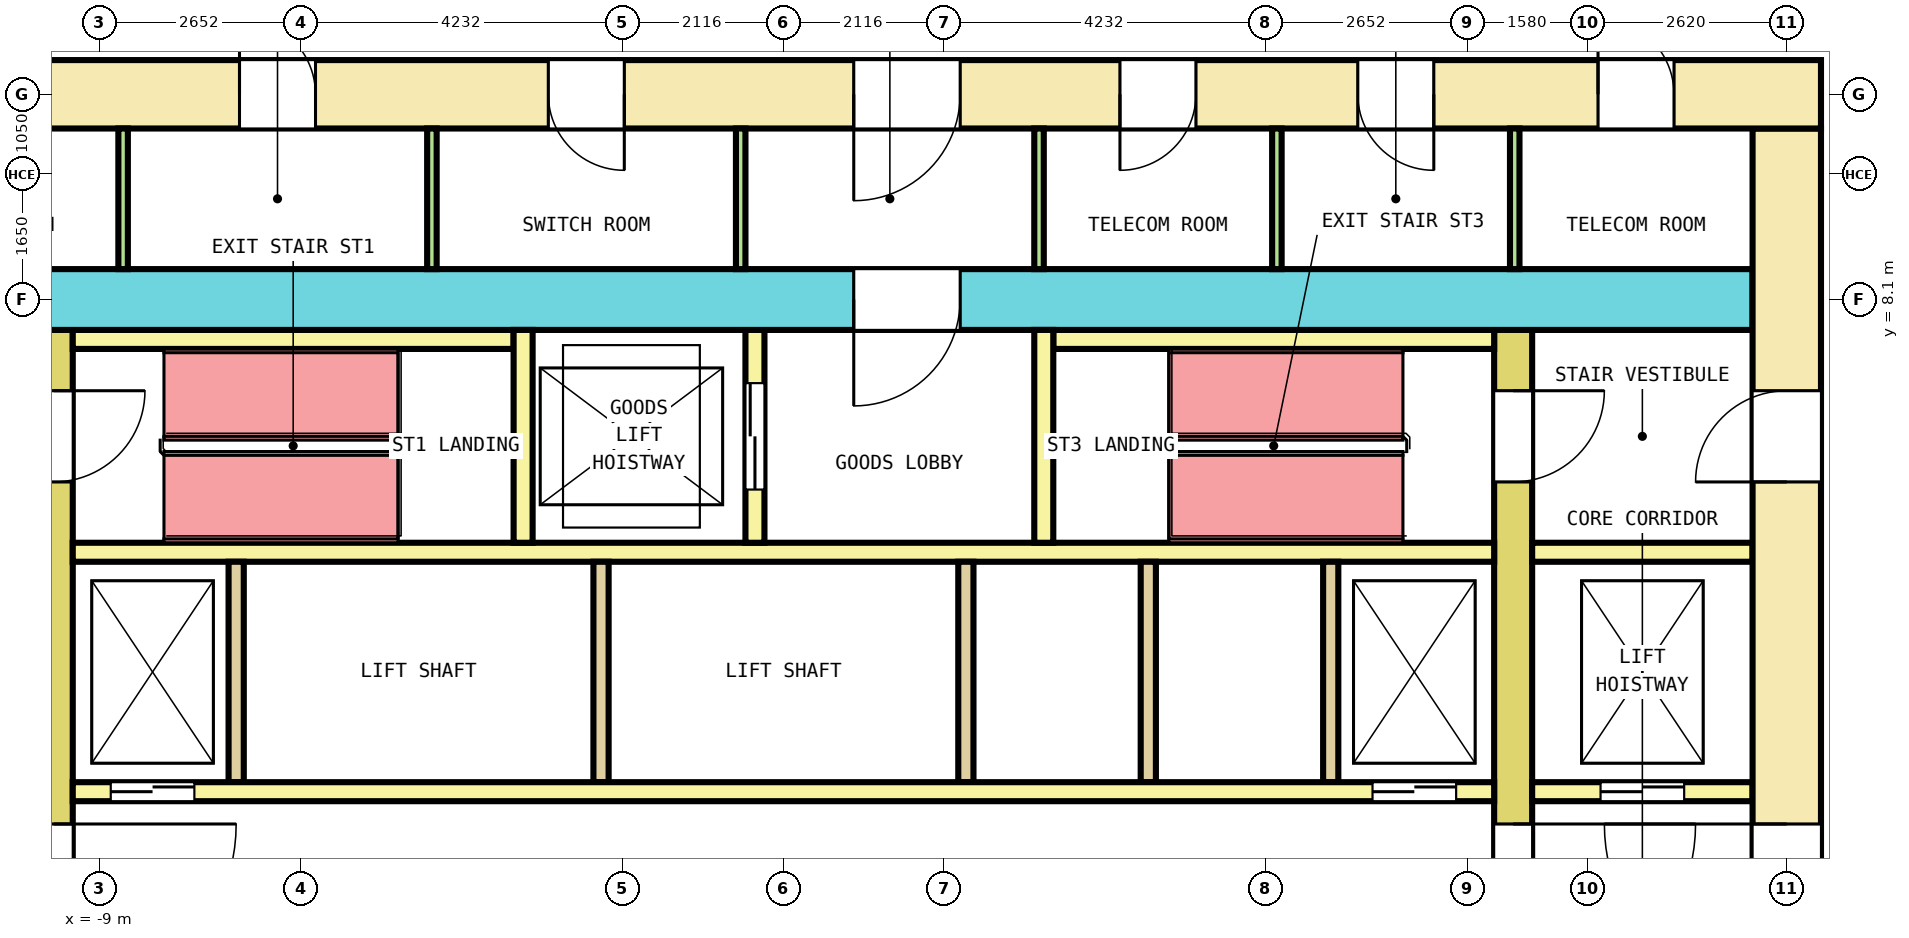
"""IFC4 building model, lengths in metres.
Left out: names, types, materials, properties, quantities, classifications, styles, units other than length and angle.
Written with IfcOpenShell. Run it as: python <this file> out.ifc"""

import sys

from ifc_helpers import new_model, si_unit, direction, frame, frame_2d, origin, place, context, subcontext, project, spatial, rectangle, extrude, element, fill, save


model = new_model("IFC4")
c1 = context("Model", 3, precision=1e-05, world=origin(), true_north=direction((0.0, 1.0)))
c2 = subcontext(c1, "Body", "Model", "MODEL_VIEW")
j1 = project(units=[si_unit("LENGTHUNIT", "METRE"), si_unit("PLANEANGLEUNIT", "RADIAN")], contexts=[c1])
p1 = place(None, origin())
s1 = spatial("IfcSite", under=j1, at=p1, CompositionType="ELEMENT")
p2 = place(p1, origin())
s2 = spatial("IfcBuilding", under=s1, at=p2, CompositionType="ELEMENT")
p3 = place(p2, frame((0.0, 0.0, 45.4)))
s3 = spatial("IfcBuildingStorey", under=s2, at=p3, CompositionType="ELEMENT", Elevation=45.4)
p4 = place(p3, frame((-13.65, 10.8, 0.0), z_axis=(0.0, 0.0, 1.0), x_axis=(1.0, 0.0, 0.0)))
e1 = element("IfcWall", 1, at=p4, inside=s3, PredefinedType="SHEAR", context=c2, shape_type="SweptSolid", body=[
    extrude(rectangle(XDim=27.3, YDim=0.9, at=frame_2d((13.65, 0.0))), origin(), (0.0, 0.0, 1.0), 4.1),
])
p5 = place(p4, frame((2.4, 0.0, 0.0)))
e2 = element("IfcOpeningElement", 2, at=p5, cuts=e1, PredefinedType="OPENING", context=c2, shape_type="SweptSolid", body=[
    extrude(rectangle(XDim=1.0, YDim=2.1, at=frame_2d((0.5, 1.05))), frame((0.0, 0.46, 0.0), z_axis=(0.0, -1.0, 0.0), x_axis=(1.0, 0.0, 0.0)), (0.0, 0.0, 1.0), 0.92),
])
p6 = place(p4, frame((6.494, 0.0, 0.0)))
e3 = element("IfcOpeningElement", 3, at=p6, cuts=e1, PredefinedType="OPENING", context=c2, shape_type="SweptSolid", body=[
    extrude(rectangle(XDim=1.0, YDim=2.1, at=frame_2d((0.5, 1.05))), frame((0.0, 0.46, 0.0), z_axis=(0.0, -1.0, 0.0), x_axis=(1.0, 0.0, 0.0)), (0.0, 0.0, 1.0), 0.92),
])
p7 = place(p4, frame((10.556, 0.0, 0.0)))
e4 = element("IfcOpeningElement", 4, at=p7, cuts=e1, PredefinedType="OPENING", context=c2, shape_type="SweptSolid", body=[
    extrude(rectangle(XDim=1.0, YDim=2.1, at=frame_2d((0.5, 1.05))), frame((0.0, 0.46, 0.0), z_axis=(0.0, -1.0, 0.0), x_axis=(1.0, 0.0, 0.0)), (0.0, 0.0, 1.0), 0.92),
])
p8 = place(p4, frame((18.077, 0.0, 0.0)))
e5 = element("IfcOpeningElement", 5, at=p8, cuts=e1, PredefinedType="OPENING", context=c2, shape_type="SweptSolid", body=[
    extrude(rectangle(XDim=1.0, YDim=2.1, at=frame_2d((0.5, 1.05))), frame((0.0, 0.46, 0.0), z_axis=(0.0, -1.0, 0.0), x_axis=(1.0, 0.0, 0.0)), (0.0, 0.0, 1.0), 0.92),
])
p9 = place(p4, frame((21.206, 0.0, 0.0)))
e6 = element("IfcOpeningElement", 6, at=p9, cuts=e1, PredefinedType="OPENING", context=c2, shape_type="SweptSolid", body=[
    extrude(rectangle(XDim=1.0, YDim=2.1, at=frame_2d((0.5, 1.05))), frame((0.0, 0.46, 0.0), z_axis=(0.0, -1.0, 0.0), x_axis=(1.0, 0.0, 0.0)), (0.0, 0.0, 1.0), 0.92),
])
p10 = place(p4, frame((24.367, 0.0, 0.0)))
e7 = element("IfcOpeningElement", 7, at=p10, cuts=e1, PredefinedType="OPENING", context=c2, shape_type="SweptSolid", body=[
    extrude(rectangle(XDim=1.0, YDim=2.1, at=frame_2d((0.5, 1.05))), frame((0.0, 0.46, 0.0), z_axis=(0.0, -1.0, 0.0), x_axis=(1.0, 0.0, 0.0)), (0.0, 0.0, 1.0), 0.92),
])
p11 = place(p4, frame((14.575, 0.0, 0.0)))
e8 = element("IfcOpeningElement", 8, at=p11, cuts=e1, PredefinedType="OPENING", context=c2, shape_type="SweptSolid", body=[
    extrude(rectangle(XDim=1.4, YDim=2.1, at=frame_2d((0.7, 1.05))), frame((0.0, 0.46, 0.0), z_axis=(0.0, -1.0, 0.0), x_axis=(1.0, 0.0, 0.0)), (0.0, 0.0, 1.0), 0.92),
])
p12 = place(p3, frame((13.2, -10.35, 0.0), z_axis=(0.0, 0.0, 1.0), x_axis=(0.0, 1.0, 0.0)))
e9 = element("IfcWall", 9, at=p12, inside=s3, PredefinedType="SHEAR", context=c2, shape_type="SweptSolid", body=[
    extrude(rectangle(XDim=20.7, YDim=0.9, at=frame_2d((10.35, 0.0))), origin(), (0.0, 0.0, 1.0), 4.1),
])
p13 = place(p12, frame((9.15, 0.0, 0.0)))
e10 = element("IfcOpeningElement", 10, at=p13, cuts=e9, PredefinedType="OPENING", context=c2, shape_type="SweptSolid", body=[
    extrude(rectangle(XDim=2.4, YDim=2.1, at=frame_2d((1.2, 1.05))), frame((0.0, 0.46, 0.0), z_axis=(0.0, -1.0, 0.0), x_axis=(1.0, 0.0, 0.0)), (0.0, 0.0, 1.0), 0.92),
])
p14 = place(p12, frame((16.05, 0.0, 0.0)))
e11 = element("IfcOpeningElement", 11, at=p14, cuts=e9, PredefinedType="OPENING", context=c2, shape_type="SweptSolid", body=[
    extrude(rectangle(XDim=1.2, YDim=2.1, at=frame_2d((0.6, 1.05))), frame((0.0, 0.46, 0.0), z_axis=(0.0, -1.0, 0.0), x_axis=(1.0, 0.0, 0.0)), (0.0, 0.0, 1.0), 0.92),
])
p15 = place(p12, frame((3.55, 0.0, 0.0)))
e12 = element("IfcOpeningElement", 12, at=p15, cuts=e9, PredefinedType="OPENING", context=c2, shape_type="SweptSolid", body=[
    extrude(rectangle(XDim=1.0, YDim=2.1, at=frame_2d((0.5, 1.05))), frame((0.0, 0.46, 0.0), z_axis=(0.0, -1.0, 0.0), x_axis=(1.0, 0.0, 0.0)), (0.0, 0.0, 1.0), 0.92),
])
p16 = place(p3, frame((-12.75, 8.1, 0.0), z_axis=(0.0, 0.0, 1.0), x_axis=(1.0, 0.0, 0.0)))
e13 = element("IfcWall", 13, at=p16, inside=s3, PredefinedType="SHEAR", context=c2, shape_type="SweptSolid", body=[
    extrude(rectangle(XDim=25.5, YDim=0.8, at=frame_2d((12.75, 0.0))), origin(), (0.0, 0.0, 1.0), 4.1),
])
p17 = place(p16, frame((13.675, 0.0, 0.0)))
e14 = element("IfcOpeningElement", 14, at=p17, cuts=e13, PredefinedType="OPENING", context=c2, shape_type="SweptSolid", body=[
    extrude(rectangle(XDim=1.4, YDim=2.1, at=frame_2d((0.7, 1.05))), frame((0.0, 0.41, 0.0), z_axis=(0.0, -1.0, 0.0), x_axis=(1.0, 0.0, 0.0)), (0.0, 0.0, 1.0), 0.82),
])
p18 = place(p3, frame((-9.6, -7.7, 0.0), z_axis=(0.0, 0.0, 1.0), x_axis=(0.0, 1.0, 0.0)))
e15 = element("IfcWall", 15, at=p18, inside=s3, PredefinedType="SHEAR", context=c2, shape_type="SweptSolid", body=[
    extrude(rectangle(XDim=15.4, YDim=0.5, at=frame_2d((7.7, 0.0))), origin(), (0.0, 0.0, 1.0), 4.1),
])
p19 = place(p18, frame((6.5, 0.0, 0.0)))
e16 = element("IfcOpeningElement", 16, at=p19, cuts=e15, PredefinedType="OPENING", context=c2, shape_type="SweptSolid", body=[
    extrude(rectangle(XDim=2.4, YDim=2.1, at=frame_2d((1.2, 1.05))), frame((0.0, 0.26, 0.0), z_axis=(0.0, -1.0, 0.0), x_axis=(1.0, 0.0, 0.0)), (0.0, 0.0, 1.0), 0.52),
])
p20 = place(p18, frame((13.4, 0.0, 0.0)))
e17 = element("IfcOpeningElement", 17, at=p20, cuts=e15, PredefinedType="OPENING", context=c2, shape_type="SweptSolid", body=[
    extrude(rectangle(XDim=1.2, YDim=2.1, at=frame_2d((0.6, 1.05))), frame((0.0, 0.26, 0.0), z_axis=(0.0, -1.0, 0.0), x_axis=(1.0, 0.0, 0.0)), (0.0, 0.0, 1.0), 0.52),
])
p21 = place(p18, frame((0.8, 0.0, 0.0)))
e18 = element("IfcOpeningElement", 18, at=p21, cuts=e15, PredefinedType="OPENING", context=c2, shape_type="SweptSolid", body=[
    extrude(rectangle(XDim=1.2, YDim=2.1, at=frame_2d((0.6, 1.05))), frame((0.0, 0.26, 0.0), z_axis=(0.0, -1.0, 0.0), x_axis=(1.0, 0.0, 0.0)), (0.0, 0.0, 1.0), 0.52),
])
p22 = place(p3, frame((9.6, -7.7, 0.0), z_axis=(0.0, 0.0, 1.0), x_axis=(0.0, 1.0, 0.0)))
e19 = element("IfcWall", 19, at=p22, inside=s3, PredefinedType="SHEAR", context=c2, shape_type="SweptSolid", body=[
    extrude(rectangle(XDim=15.4, YDim=0.5, at=frame_2d((7.7, 0.0))), origin(), (0.0, 0.0, 1.0), 4.1),
])
p23 = place(p22, frame((6.5, 0.0, 0.0)))
e20 = element("IfcOpeningElement", 20, at=p23, cuts=e19, PredefinedType="OPENING", context=c2, shape_type="SweptSolid", body=[
    extrude(rectangle(XDim=2.4, YDim=2.1, at=frame_2d((1.2, 1.05))), frame((0.0, 0.26, 0.0), z_axis=(0.0, -1.0, 0.0), x_axis=(1.0, 0.0, 0.0)), (0.0, 0.0, 1.0), 0.52),
])
p24 = place(p22, frame((13.4, 0.0, 0.0)))
e21 = element("IfcOpeningElement", 21, at=p24, cuts=e19, PredefinedType="OPENING", context=c2, shape_type="SweptSolid", body=[
    extrude(rectangle(XDim=1.2, YDim=2.1, at=frame_2d((0.6, 1.05))), frame((0.0, 0.26, 0.0), z_axis=(0.0, -1.0, 0.0), x_axis=(1.0, 0.0, 0.0)), (0.0, 0.0, 1.0), 0.52),
])
p25 = place(p22, frame((0.9, 0.0, 0.0)))
e22 = element("IfcOpeningElement", 22, at=p25, cuts=e19, PredefinedType="OPENING", context=c2, shape_type="SweptSolid", body=[
    extrude(rectangle(XDim=1.0, YDim=2.1, at=frame_2d((0.5, 1.05))), frame((0.0, 0.26, 0.0), z_axis=(0.0, -1.0, 0.0), x_axis=(1.0, 0.0, 0.0)), (0.0, 0.0, 1.0), 0.52),
])
p26 = place(p3, frame((-9.35, 1.625, 0.0), z_axis=(0.0, 0.0, 1.0), x_axis=(1.0, 0.0, 0.0)))
e23 = element("IfcWall", 23, at=p26, inside=s3, PredefinedType="SOLIDWALL", context=c2, shape_type="SweptSolid", body=[
    extrude(rectangle(XDim=18.7, YDim=0.25, at=frame_2d((9.35, 0.0))), origin(), (0.0, 0.0, 1.0), 4.1),
])
p27 = place(p26, frame((0.5, 0.0, 0.0)))
e24 = element("IfcOpeningElement", 24, at=p27, cuts=e23, PredefinedType="OPENING", context=c2, shape_type="SweptSolid", body=[
    extrude(rectangle(XDim=1.1, YDim=2.1, at=frame_2d((0.55, 1.05))), frame((0.0, 0.135, 0.0), z_axis=(0.0, -1.0, 0.0), x_axis=(1.0, 0.0, 0.0)), (0.0, 0.0, 1.0), 0.27),
])
p28 = place(p26, frame((17.1, 0.0, 0.0)))
e25 = element("IfcOpeningElement", 25, at=p28, cuts=e23, PredefinedType="OPENING", context=c2, shape_type="SweptSolid", body=[
    extrude(rectangle(XDim=1.1, YDim=2.1, at=frame_2d((0.55, 1.05))), frame((0.0, 0.135, 0.0), z_axis=(0.0, -1.0, 0.0), x_axis=(1.0, 0.0, 0.0)), (0.0, 0.0, 1.0), 0.27),
])
p29 = place(p3, frame((9.85, 1.625, 0.0), z_axis=(0.0, 0.0, 1.0), x_axis=(1.0, 0.0, 0.0)))
e26 = element("IfcWall", 26, at=p29, inside=s3, PredefinedType="SOLIDWALL", context=c2, shape_type="SweptSolid", body=[
    extrude(rectangle(XDim=2.9, YDim=0.25, at=frame_2d((1.45, 0.0))), origin(), (0.0, 0.0, 1.0), 4.1),
])
p30 = place(p29, frame((0.9, 0.0, 0.0)))
e27 = element("IfcOpeningElement", 27, at=p30, cuts=e26, PredefinedType="OPENING", context=c2, shape_type="SweptSolid", body=[
    extrude(rectangle(XDim=1.1, YDim=2.1, at=frame_2d((0.55, 1.05))), frame((0.0, 0.135, 0.0), z_axis=(0.0, -1.0, 0.0), x_axis=(1.0, 0.0, 0.0)), (0.0, 0.0, 1.0), 0.27),
])
p31 = place(p3, frame((-9.35, 4.775, 0.0), z_axis=(0.0, 0.0, 1.0), x_axis=(1.0, 0.0, 0.0)))
e28 = element("IfcWall", 28, at=p31, inside=s3, PredefinedType="SOLIDWALL", context=c2, shape_type="SweptSolid", body=[
    extrude(rectangle(XDim=18.7, YDim=0.25, at=frame_2d((9.35, 0.0))), origin(), (0.0, 0.0, 1.0), 4.1),
])
p32 = place(p3, frame((9.85, 4.775, 0.0), z_axis=(0.0, 0.0, 1.0), x_axis=(1.0, 0.0, 0.0)))
e29 = element("IfcWall", 29, at=p32, inside=s3, PredefinedType="SOLIDWALL", context=c2, shape_type="SweptSolid", body=[
    extrude(rectangle(XDim=2.9, YDim=0.25, at=frame_2d((1.45, 0.0))), origin(), (0.0, 0.0, 1.0), 4.1),
])
for number, where, z_axis, x_axis in (
    (30, (-7.2, 1.75, 0.0), (0.0, 0.0, 1.0), (0.0, 1.0, 0.0)),
    (31, (-2.4, 1.75, 0.0), (0.0, 0.0, 1.0), (0.0, 1.0, 0.0)),
    (32, (2.4, 1.75, 0.0), (0.0, 0.0, 1.0), (0.0, 1.0, 0.0)),
    (33, (4.8, 1.75, 0.0), (0.0, 0.0, 1.0), (0.0, 1.0, 0.0)),
    (34, (7.2, 1.75, 0.0), (0.0, 0.0, 1.0), (0.0, 1.0, 0.0)),
):
    element("IfcWall", number, at=place(p3, frame(where, z_axis=z_axis, x_axis=x_axis)), inside=s3, PredefinedType="SOLIDWALL", context=c2, shape_type="SweptSolid", body=[
        extrude(rectangle(XDim=2.9, YDim=0.2, at=frame_2d((1.45, 0.0))), origin(), (0.0, 0.0, 1.0), 4.1),
    ])
for number, where, z_axis, x_axis in (
    (35, (-9.35, 7.575, 0.0), (0.0, 0.0, 1.0), (1.0, 0.0, 0.0)),
    (36, (3.55, 7.575, 0.0), (0.0, 0.0, 1.0), (1.0, 0.0, 0.0)),
):
    element("IfcWall", number, at=place(p3, frame(where, z_axis=z_axis, x_axis=x_axis)), inside=s3, PredefinedType="SOLIDWALL", context=c2, shape_type="SweptSolid", body=[
        extrude(rectangle(XDim=5.8, YDim=0.25, at=frame_2d((2.9, 0.0))), origin(), (0.0, 0.0, 1.0), 4.1),
    ])
p33 = place(p3, frame((-3.425, 4.9, 0.0), z_axis=(0.0, 0.0, 1.0), x_axis=(0.0, 1.0, 0.0)))
e37 = element("IfcWall", 37, at=p33, inside=s3, PredefinedType="SOLIDWALL", context=c2, shape_type="SweptSolid", body=[
    extrude(rectangle(XDim=2.8, YDim=0.25, at=frame_2d((1.4, 0.0))), origin(), (0.0, 0.0, 1.0), 4.1),
])
p34 = place(p3, frame((-0.375, 4.9, 0.0), z_axis=(0.0, 0.0, 1.0), x_axis=(0.0, 1.0, 0.0)))
e38 = element("IfcWall", 38, at=p34, inside=s3, PredefinedType="SOLIDWALL", context=c2, shape_type="SweptSolid", body=[
    extrude(rectangle(XDim=2.8, YDim=0.25, at=frame_2d((1.4, 0.0))), origin(), (0.0, 0.0, 1.0), 4.1),
])
p35 = place(p34, frame((0.7, 0.0, 0.0)))
e39 = element("IfcOpeningElement", 39, at=p35, cuts=e38, PredefinedType="OPENING", context=c2, shape_type="SweptSolid", body=[
    extrude(rectangle(XDim=1.4, YDim=2.1, at=frame_2d((0.7, 1.05))), frame((0.0, 0.135, 0.0), z_axis=(0.0, -1.0, 0.0), x_axis=(1.0, 0.0, 0.0)), (0.0, 0.0, 1.0), 0.27),
])
p36 = place(p3, frame((3.425, 4.9, 0.0), z_axis=(0.0, 0.0, 1.0), x_axis=(0.0, 1.0, 0.0)))
e40 = element("IfcWall", 40, at=p36, inside=s3, PredefinedType="SOLIDWALL", context=c2, shape_type="SweptSolid", body=[
    extrude(rectangle(XDim=2.8, YDim=0.25, at=frame_2d((1.4, 0.0))), origin(), (0.0, 0.0, 1.0), 4.1),
])
for number, where, z_axis, x_axis in (
    (41, (-8.688, 8.5, 0.0), (0.0, 0.0, 1.0), (0.0, 1.0, 0.0)),
    (42, (-4.625, 8.5, 0.0), (0.0, 0.0, 1.0), (0.0, 1.0, 0.0)),
    (43, (-0.562, 8.5, 0.0), (0.0, 0.0, 1.0), (0.0, 1.0, 0.0)),
    (44, (3.363, 8.5, 0.0), (0.0, 0.0, 1.0), (0.0, 1.0, 0.0)),
    (45, (6.492, 8.5, 0.0), (0.0, 0.0, 1.0), (0.0, 1.0, 0.0)),
    (46, (9.621, 8.5, 0.0), (0.0, 0.0, 1.0), (0.0, 1.0, 0.0)),
):
    element("IfcWall", number, at=place(p3, frame(where, z_axis=z_axis, x_axis=x_axis)), inside=s3, PredefinedType="PARTITIONING", context=c2, shape_type="SweptSolid", body=[
        extrude(rectangle(XDim=1.85, YDim=0.125, at=frame_2d((0.925, 0.0))), origin(), (0.0, 0.0, 1.0), 4.1),
    ])
p37 = place(p27, origin())
e47 = element("IfcDoor", 47, at=p37, inside=s3, OperationType="DOUBLE_DOOR_SLIDING", PredefinedType="DOOR", context=c2, shape_type="SweptSolid", body=[
    extrude(rectangle(XDim=1.1, YDim=2.1, at=frame_2d((0.55, 1.05))), frame((0.0, 0.075, 0.0), z_axis=(0.0, -1.0, 0.0), x_axis=(1.0, 0.0, 0.0)), (0.0, 0.0, 1.0), 0.15),
])
fill(e24, e47)
p38 = place(p28, origin())
e48 = element("IfcDoor", 48, at=p38, inside=s3, OperationType="DOUBLE_DOOR_SLIDING", PredefinedType="DOOR", context=c2, shape_type="SweptSolid", body=[
    extrude(rectangle(XDim=1.1, YDim=2.1, at=frame_2d((0.55, 1.05))), frame((0.0, 0.075, 0.0), z_axis=(0.0, -1.0, 0.0), x_axis=(1.0, 0.0, 0.0)), (0.0, 0.0, 1.0), 0.15),
])
fill(e25, e48)
p39 = place(p30, origin())
e49 = element("IfcDoor", 49, at=p39, inside=s3, OperationType="DOUBLE_DOOR_SLIDING", PredefinedType="DOOR", context=c2, shape_type="SweptSolid", body=[
    extrude(rectangle(XDim=1.1, YDim=2.1, at=frame_2d((0.55, 1.05))), frame((0.0, 0.075, 0.0), z_axis=(0.0, -1.0, 0.0), x_axis=(1.0, 0.0, 0.0)), (0.0, 0.0, 1.0), 0.15),
])
fill(e27, e49)
p40 = place(p35, origin())
e50 = element("IfcDoor", 50, at=p40, inside=s3, OperationType="DOUBLE_DOOR_SLIDING", PredefinedType="DOOR", context=c2, shape_type="SweptSolid", body=[
    extrude(rectangle(XDim=1.4, YDim=2.1, at=frame_2d((0.7, 1.05))), frame((0.0, 0.075, 0.0), z_axis=(0.0, -1.0, 0.0), x_axis=(1.0, 0.0, 0.0)), (0.0, 0.0, 1.0), 0.15),
])
fill(e39, e50)
p41 = place(p19, origin())
e51 = element("IfcDoor", 51, at=p41, inside=s3, OperationType="DOUBLE_DOOR_SINGLE_SWING", PredefinedType="DOOR", context=c2, shape_type="SweptSolid", body=[
    extrude(rectangle(XDim=2.4, YDim=2.1, at=frame_2d((1.2, 1.05))), frame((0.0, 0.2, 0.0), z_axis=(0.0, -1.0, 0.0), x_axis=(1.0, 0.0, 0.0)), (0.0, 0.0, 1.0), 0.4),
])
fill(e16, e51)
p42 = place(p23, origin())
e52 = element("IfcDoor", 52, at=p42, inside=s3, OperationType="DOUBLE_DOOR_SINGLE_SWING", PredefinedType="DOOR", context=c2, shape_type="SweptSolid", body=[
    extrude(rectangle(XDim=2.4, YDim=2.1, at=frame_2d((1.2, 1.05))), frame((0.0, 0.2, 0.0), z_axis=(0.0, -1.0, 0.0), x_axis=(1.0, 0.0, 0.0)), (0.0, 0.0, 1.0), 0.4),
])
fill(e20, e52)
p43 = place(p13, origin())
e53 = element("IfcDoor", 53, at=p43, inside=s3, OperationType="DOUBLE_DOOR_SINGLE_SWING", PredefinedType="DOOR", context=c2, shape_type="SweptSolid", body=[
    extrude(rectangle(XDim=2.4, YDim=2.1, at=frame_2d((1.2, 1.05))), frame((0.0, 0.3, 0.0), z_axis=(0.0, -1.0, 0.0), x_axis=(1.0, 0.0, 0.0)), (0.0, 0.0, 1.0), 0.6),
])
fill(e10, e53)
p44 = place(p20, origin())
e54 = element("IfcDoor", 54, at=p44, inside=s3, OperationType="SINGLE_SWING_LEFT", PredefinedType="DOOR", context=c2, shape_type="SweptSolid", body=[
    extrude(rectangle(XDim=1.2, YDim=2.1, at=frame_2d((0.6, 1.05))), frame((0.0, 0.2, 0.0), z_axis=(0.0, -1.0, 0.0), x_axis=(1.0, 0.0, 0.0)), (0.0, 0.0, 1.0), 0.4),
])
fill(e17, e54)
p45 = place(p24, origin())
e55 = element("IfcDoor", 55, at=p45, inside=s3, OperationType="SINGLE_SWING_LEFT", PredefinedType="DOOR", context=c2, shape_type="SweptSolid", body=[
    extrude(rectangle(XDim=1.2, YDim=2.1, at=frame_2d((0.6, 1.05))), frame((0.0, 0.2, 0.0), z_axis=(0.0, -1.0, 0.0), x_axis=(1.0, 0.0, 0.0)), (0.0, 0.0, 1.0), 0.4),
])
fill(e21, e55)
p46 = place(p14, origin())
e56 = element("IfcDoor", 56, at=p46, inside=s3, OperationType="SINGLE_SWING_RIGHT", PredefinedType="DOOR", context=c2, shape_type="SweptSolid", body=[
    extrude(rectangle(XDim=1.2, YDim=2.1, at=frame_2d((0.6, 1.05))), frame((0.0, 0.3, 0.0), z_axis=(0.0, -1.0, 0.0), x_axis=(1.0, 0.0, 0.0)), (0.0, 0.0, 1.0), 0.6),
])
fill(e11, e56)
p47 = place(p17, origin())
e57 = element("IfcDoor", 57, at=p47, inside=s3, OperationType="DOUBLE_DOOR_SINGLE_SWING", PredefinedType="DOOR", context=c2, shape_type="SweptSolid", body=[
    extrude(rectangle(XDim=1.4, YDim=2.1, at=frame_2d((0.7, 1.05))), frame((0.0, 0.3, 0.0), z_axis=(0.0, -1.0, 0.0), x_axis=(1.0, 0.0, 0.0)), (0.0, 0.0, 1.0), 0.6),
])
fill(e14, e57)
p48 = place(p6, origin())
e58 = element("IfcDoor", 58, at=p48, inside=s3, OperationType="SINGLE_SWING_RIGHT", PredefinedType="DOOR", context=c2, shape_type="SweptSolid", body=[
    extrude(rectangle(XDim=1.0, YDim=2.1, at=frame_2d((0.5, 1.05))), frame((0.0, 0.3, 0.0), z_axis=(0.0, -1.0, 0.0), x_axis=(1.0, 0.0, 0.0)), (0.0, 0.0, 1.0), 0.6),
])
fill(e3, e58)
p49 = place(p7, origin())
e59 = element("IfcDoor", 59, at=p49, inside=s3, OperationType="SINGLE_SWING_LEFT", PredefinedType="DOOR", context=c2, shape_type="SweptSolid", body=[
    extrude(rectangle(XDim=1.0, YDim=2.1, at=frame_2d((0.5, 1.05))), frame((0.0, 0.3, 0.0), z_axis=(0.0, -1.0, 0.0), x_axis=(1.0, 0.0, 0.0)), (0.0, 0.0, 1.0), 0.6),
])
fill(e4, e59)
p50 = place(p8, origin())
e60 = element("IfcDoor", 60, at=p50, inside=s3, OperationType="SINGLE_SWING_RIGHT", PredefinedType="DOOR", context=c2, shape_type="SweptSolid", body=[
    extrude(rectangle(XDim=1.0, YDim=2.1, at=frame_2d((0.5, 1.05))), frame((0.0, 0.3, 0.0), z_axis=(0.0, -1.0, 0.0), x_axis=(1.0, 0.0, 0.0)), (0.0, 0.0, 1.0), 0.6),
])
fill(e5, e60)
p51 = place(p9, origin())
e61 = element("IfcDoor", 61, at=p51, inside=s3, OperationType="SINGLE_SWING_LEFT", PredefinedType="DOOR", context=c2, shape_type="SweptSolid", body=[
    extrude(rectangle(XDim=1.0, YDim=2.1, at=frame_2d((0.5, 1.05))), frame((0.0, 0.3, 0.0), z_axis=(0.0, -1.0, 0.0), x_axis=(1.0, 0.0, 0.0)), (0.0, 0.0, 1.0), 0.6),
])
fill(e6, e61)
p52 = place(p10, origin())
e62 = element("IfcDoor", 62, at=p52, inside=s3, OperationType="SINGLE_SWING_RIGHT", PredefinedType="DOOR", context=c2, shape_type="SweptSolid", body=[
    extrude(rectangle(XDim=1.0, YDim=2.1, at=frame_2d((0.5, 1.05))), frame((0.0, 0.3, 0.0), z_axis=(0.0, -1.0, 0.0), x_axis=(1.0, 0.0, 0.0)), (0.0, 0.0, 1.0), 0.6),
])
fill(e7, e62)
p53 = place(p11, origin())
e63 = element("IfcDoor", 63, at=p53, inside=s3, OperationType="DOUBLE_DOOR_SINGLE_SWING", PredefinedType="DOOR", context=c2, shape_type="SweptSolid", body=[
    extrude(rectangle(XDim=1.4, YDim=2.1, at=frame_2d((0.7, 1.05))), frame((0.0, 0.3, 0.0), z_axis=(0.0, -1.0, 0.0), x_axis=(1.0, 0.0, 0.0)), (0.0, 0.0, 1.0), 0.6),
])
fill(e8, e63)
save(model, sys.argv[1])
